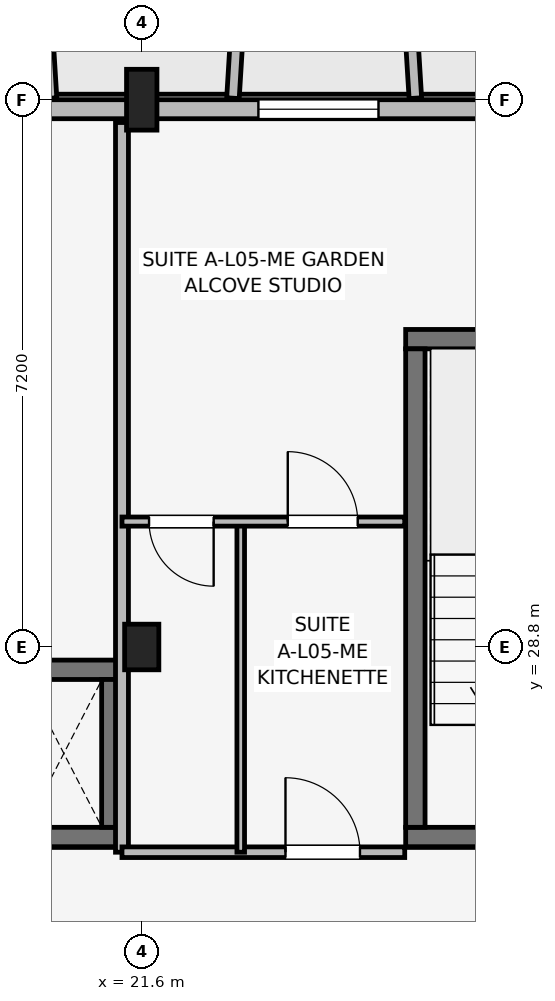
"""IFC4 building model, lengths in metres.
Left out: names, types, materials, properties, quantities, classifications, styles, units other than length and angle.
Written with IfcOpenShell. Run it as: python <this file> out.ifc"""

import sys

from ifc_helpers import new_model, si_unit, direction, frame, frame_2d, origin, origin_2d, place, context, subcontext, project, spatial, rectangle, extrude, element, fill, save


model = new_model("IFC4")
c1 = context("Model", 3, precision=1e-05, world=origin(), true_north=direction((0.0, 1.0)))
c2 = subcontext(c1, "Body", "Model", "MODEL_VIEW")
j1 = project(units=[si_unit("LENGTHUNIT", "METRE"), si_unit("PLANEANGLEUNIT", "RADIAN")], contexts=[c1])
p1 = place(None, origin())
s1 = spatial("IfcSite", under=j1, at=p1, CompositionType="ELEMENT")
p2 = place(p1, origin())
s2 = spatial("IfcBuilding", under=s1, at=p2, CompositionType="ELEMENT")
p3 = place(p2, frame((0.0, 0.0, 18.15)))
s3 = spatial("IfcBuildingStorey", under=s2, at=p3, CompositionType="ELEMENT", Elevation=18.15)
p4 = place(p3, frame((21.6, 28.8, 0.0), z_axis=(0.0, 0.0, 1.0), x_axis=(1.0, 0.0, 0.0)))
e1 = element("IfcColumn", 1, at=p4, inside=s3, PredefinedType="COLUMN", context=c2, shape_type="SweptSolid", body=[
    extrude(rectangle(XDim=0.45, YDim=0.6, at=origin_2d()), origin(), (0.0, 0.0, 1.0), 3.15),
])
p5 = place(p3, frame((21.6, 36.0, 0.0), z_axis=(0.0, 0.0, 1.0), x_axis=(1.0, 0.0, 0.0)))
e2 = element("IfcColumn", 2, at=p5, inside=s3, PredefinedType="COLUMN", context=c2, shape_type="SweptSolid", body=[
    extrude(rectangle(XDim=0.4, YDim=0.8, at=origin_2d()), origin(), (0.0, 0.0, 1.0), 3.15),
])
p6 = place(p3, frame((25.073, 26.3, 0.0), z_axis=(0.0, 0.0, 1.0), x_axis=(1.0, 0.0, 0.0)))
e3 = element("IfcWall", 3, at=p6, inside=s3, PredefinedType="SHEAR", context=c2, shape_type="SweptSolid", body=[
    extrude(rectangle(XDim=3.305, YDim=0.255, at=frame_2d((1.652, 0.0))), origin(), (0.0, 0.0, 1.0), 3.15),
])
p7 = place(p6, frame((1.127, 0.0, 0.0)))
e4 = element("IfcOpeningElement", 4, at=p7, cuts=e3, PredefinedType="OPENING", context=c2, shape_type="SweptSolid", body=[
    extrude(rectangle(XDim=1.05, YDim=2.12, at=frame_2d((0.525, 1.06))), frame((0.0, 0.137, 0.0), z_axis=(0.0, -1.0, 0.0), x_axis=(1.0, 0.0, 0.0)), (0.0, 0.0, 1.0), 0.275),
])
p8 = place(p3, frame((25.073, 32.85, 0.0), z_axis=(0.0, 0.0, 1.0), x_axis=(1.0, 0.0, 0.0)))
e5 = element("IfcWall", 5, at=p8, inside=s3, PredefinedType="SHEAR", context=c2, shape_type="SweptSolid", body=[
    extrude(rectangle(XDim=3.305, YDim=0.255, at=frame_2d((1.652, 0.0))), origin(), (0.0, 0.0, 1.0), 3.15),
])
p9 = place(p3, frame((25.2, 26.427, 0.0), z_axis=(0.0, 0.0, 1.0), x_axis=(0.0, 1.0, 0.0)))
e6 = element("IfcWall", 6, at=p9, inside=s3, PredefinedType="SHEAR", context=c2, shape_type="SweptSolid", body=[
    extrude(rectangle(XDim=6.295, YDim=0.255, at=frame_2d((3.147, 0.0))), origin(), (0.0, 0.0, 1.0), 3.15),
])
for number, where, z_axis, x_axis in (
    (7, (19.522, 26.3, 0.0), (0.0, 0.0, 1.0), (1.0, 0.0, 0.0)),
    (8, (19.522, 28.5, 0.0), (0.0, 0.0, 1.0), (1.0, 0.0, 0.0)),
):
    element("IfcWall", number, at=place(p3, frame(where, z_axis=z_axis, x_axis=x_axis)), inside=s3, PredefinedType="SHEAR", context=c2, shape_type="SweptSolid", body=[
        extrude(rectangle(XDim=1.805, YDim=0.255, at=frame_2d((0.902, 0.0))), origin(), (0.0, 0.0, 1.0), 3.15),
    ])
p10 = place(p3, frame((21.2, 26.427, 0.0), z_axis=(0.0, 0.0, 1.0), x_axis=(0.0, 1.0, 0.0)))
e9 = element("IfcWall", 9, at=p10, inside=s3, PredefinedType="SHEAR", context=c2, shape_type="SweptSolid", body=[
    extrude(rectangle(XDim=1.945, YDim=0.255, at=frame_2d((0.973, 0.0))), origin(), (0.0, 0.0, 1.0), 3.15),
])
p11 = place(p3, frame((32.6, 35.875, 0.0), z_axis=(0.0, 0.0, 1.0), x_axis=(-1.0, 0.0, 0.0)))
e10 = element("IfcWall", 10, at=p11, inside=s3, PredefinedType="SOLIDWALL", context=c2, shape_type="SweptSolid", body=[
    extrude(rectangle(XDim=29.2, YDim=0.25, at=frame_2d((14.6, 0.0))), origin(), (0.0, 0.0, 1.0), 2.43),
])
p12 = place(p11, frame((28.55, 0.0, 0.0), z_axis=(0.0, 0.0, 1.0), x_axis=(-1.0, 0.0, 0.0)))
e11 = element("IfcOpeningElement", 11, at=p12, cuts=e10, PredefinedType="OPENING", context=c2, shape_type="SweptSolid", body=[
    extrude(rectangle(XDim=1.5, YDim=2.15, at=frame_2d((0.75, 1.075))), frame((0.0, 0.135, 0.0), z_axis=(0.0, -1.0, 0.0), x_axis=(1.0, 0.0, 0.0)), (0.0, 0.0, 1.0), 0.27),
])
p13 = place(p11, frame((2.225, 0.0, 0.0), z_axis=(0.0, 0.0, 1.0), x_axis=(-1.0, 0.0, 0.0)))
e12 = element("IfcOpeningElement", 12, at=p13, cuts=e10, PredefinedType="OPENING", context=c2, shape_type="SweptSolid", body=[
    extrude(rectangle(XDim=1.65, YDim=2.15, at=frame_2d((0.825, 1.075))), frame((0.0, 0.135, 0.0), z_axis=(0.0, -1.0, 0.0), x_axis=(1.0, 0.0, 0.0)), (0.0, 0.0, 1.0), 0.27),
])
p14 = place(p11, frame((14.83, 0.0, 0.5)))
e13 = element("IfcOpeningElement", 13, at=p14, cuts=e10, PredefinedType="OPENING", context=c2, shape_type="SweptSolid", body=[
    extrude(rectangle(XDim=1.15, YDim=1.68, at=frame_2d((0.575, 0.84))), frame((0.0, 0.135, 0.0), z_axis=(0.0, -1.0, 0.0), x_axis=(1.0, 0.0, 0.0)), (0.0, 0.0, 1.0), 0.27),
])
p15 = place(p11, frame((7.885, 0.0, 0.7)))
e14 = element("IfcOpeningElement", 14, at=p15, cuts=e10, PredefinedType="OPENING", context=c2, shape_type="SweptSolid", body=[
    extrude(rectangle(XDim=1.58, YDim=1.6, at=frame_2d((0.79, 0.8))), frame((0.0, 0.135, 0.0), z_axis=(0.0, -1.0, 0.0), x_axis=(1.0, 0.0, 0.0)), (0.0, 0.0, 1.0), 0.27),
])
p16 = place(p11, frame((19.64, 0.0, 0.7)))
e15 = element("IfcOpeningElement", 15, at=p16, cuts=e10, PredefinedType="OPENING", context=c2, shape_type="SweptSolid", body=[
    extrude(rectangle(XDim=1.72, YDim=1.6, at=frame_2d((0.86, 0.8))), frame((0.0, 0.135, 0.0), z_axis=(0.0, -1.0, 0.0), x_axis=(1.0, 0.0, 0.0)), (0.0, 0.0, 1.0), 0.27),
])
p17 = place(p3, frame((20.4, 36.02, 0.0), z_axis=(0.0, 0.0, 1.0), x_axis=(-0.061046865508, 0.998134900808, 0.0)))
e16 = element("IfcWall", 16, at=p17, inside=s3, PredefinedType="ELEMENTEDWALL", context=c2, shape_type="SweptSolid", body=[
    extrude(rectangle(XDim=1.964, YDim=0.165, at=frame_2d((0.982, 0.0))), origin(), (0.0, 0.0, 1.0), 2.48),
])
for number, where, z_axis, x_axis in (
    (17, (22.8, 36.02, 0.0), (0.0, 0.0, 1.0), (0.061, 0.998, 0.0)),
    (18, (25.2, 36.02, 0.0), (0.0, 0.0, 1.0), (-0.061, 0.998, 0.0)),
):
    element("IfcWall", number, at=place(p3, frame(where, z_axis=z_axis, x_axis=x_axis)), inside=s3, PredefinedType="ELEMENTEDWALL", context=c2, shape_type="SweptSolid", body=[
        extrude(rectangle(XDim=1.964, YDim=0.165, at=frame_2d((0.982, 0.0))), origin(), (0.0, 0.0, 1.0), 2.53),
    ])
p18 = place(p3, frame((21.34, 26.1, 0.0), z_axis=(0.0, 0.0, 1.0), x_axis=(0.0, 1.0, 0.0)))
e19 = element("IfcWall", 19, at=p18, inside=s3, PredefinedType="PARTITIONING", context=c2, shape_type="SweptSolid", body=[
    extrude(rectangle(XDim=9.6, YDim=0.17, at=frame_2d((4.8, 0.0))), origin(), (0.0, 0.0, 1.0), 2.38),
])
p19 = place(p3, frame((21.34, 26.1, 0.0), z_axis=(0.0, 0.0, 1.0), x_axis=(1.0, 0.0, 0.0)))
e20 = element("IfcWall", 20, at=p19, inside=s3, PredefinedType="PARTITIONING", context=c2, shape_type="SweptSolid", body=[
    extrude(rectangle(XDim=3.72, YDim=0.14, at=frame_2d((1.86, 0.0))), origin(), (0.0, 0.0, 1.0), 2.38),
])
p20 = place(p19, frame((2.151, 0.0, 0.0)))
e21 = element("IfcOpeningElement", 21, at=p20, cuts=e20, PredefinedType="OPENING", context=c2, shape_type="SweptSolid", body=[
    extrude(rectangle(XDim=0.98, YDim=2.1, at=frame_2d((0.49, 1.05))), frame((0.0, 0.08, 0.0), z_axis=(0.0, -1.0, 0.0), x_axis=(1.0, 0.0, 0.0)), (0.0, 0.0, 1.0), 0.16),
])
p21 = place(p3, frame((22.902, 26.1, 0.0), z_axis=(0.0, 0.0, 1.0), x_axis=(0.0, 1.0, 0.0)))
e22 = element("IfcWall", 22, at=p21, inside=s3, PredefinedType="PARTITIONING", context=c2, shape_type="SweptSolid", body=[
    extrude(rectangle(XDim=4.35, YDim=0.1, at=frame_2d((2.175, 0.0))), origin(), (0.0, 0.0, 1.0), 2.375),
])
p22 = place(p3, frame((21.34, 30.45, 0.0), z_axis=(0.0, 0.0, 1.0), x_axis=(1.0, 0.0, 0.0)))
e23 = element("IfcWall", 23, at=p22, inside=s3, PredefinedType="PARTITIONING", context=c2, shape_type="SweptSolid", body=[
    extrude(rectangle(XDim=3.72, YDim=0.12, at=frame_2d((1.86, 0.0))), origin(), (0.0, 0.0, 1.0), 2.38),
])
p23 = place(p22, frame((1.206, 0.0, 0.0), z_axis=(0.0, 0.0, 1.0), x_axis=(-1.0, 0.0, 0.0)))
e24 = element("IfcOpeningElement", 24, at=p23, cuts=e23, PredefinedType="OPENING", context=c2, shape_type="SweptSolid", body=[
    extrude(rectangle(XDim=0.85, YDim=2.08, at=frame_2d((0.425, 1.04))), frame((0.0, 0.07, 0.0), z_axis=(0.0, -1.0, 0.0), x_axis=(1.0, 0.0, 0.0)), (0.0, 0.0, 1.0), 0.14),
])
p24 = place(p22, frame((2.181, 0.0, 0.0)))
e25 = element("IfcOpeningElement", 25, at=p24, cuts=e23, PredefinedType="OPENING", context=c2, shape_type="SweptSolid", body=[
    extrude(rectangle(XDim=0.92, YDim=2.08, at=frame_2d((0.46, 1.04))), frame((0.0, 0.07, 0.0), z_axis=(0.0, -1.0, 0.0), x_axis=(1.0, 0.0, 0.0)), (0.0, 0.0, 1.0), 0.14),
])
p25 = place(p15, origin())
e26 = element("IfcWindow", 26, at=p25, inside=s3, PartitioningType="SINGLE_PANEL", PredefinedType="WINDOW", context=c2, shape_type="SweptSolid", body=[
    extrude(rectangle(XDim=1.58, YDim=1.6, at=frame_2d((0.79, 0.8))), frame((0.0, 0.03, 0.0), z_axis=(0.0, -1.0, 0.0), x_axis=(1.0, 0.0, 0.0)), (0.0, 0.0, 1.0), 0.06),
])
fill(e14, e26)
p26 = place(p20, origin())
e27 = element("IfcDoor", 27, at=p26, inside=s3, OperationType="SINGLE_SWING_LEFT", PredefinedType="DOOR", context=c2, shape_type="SweptSolid", body=[
    extrude(rectangle(XDim=0.98, YDim=2.1, at=frame_2d((0.49, 1.05))), frame((0.0, 0.025, 0.0), z_axis=(0.0, -1.0, 0.0), x_axis=(1.0, 0.0, 0.0)), (0.0, 0.0, 1.0), 0.05),
])
fill(e21, e27)
p27 = place(p23, origin())
e28 = element("IfcDoor", 28, at=p27, inside=s3, OperationType="SINGLE_SWING_RIGHT", PredefinedType="DOOR", context=c2, shape_type="SweptSolid", body=[
    extrude(rectangle(XDim=0.85, YDim=2.08, at=frame_2d((0.425, 1.04))), frame((0.0, 0.025, 0.0), z_axis=(0.0, -1.0, 0.0), x_axis=(1.0, 0.0, 0.0)), (0.0, 0.0, 1.0), 0.05),
])
fill(e24, e28)
p28 = place(p24, origin())
e29 = element("IfcDoor", 29, at=p28, inside=s3, OperationType="SINGLE_SWING_LEFT", PredefinedType="DOOR", context=c2, shape_type="SweptSolid", body=[
    extrude(rectangle(XDim=0.92, YDim=2.08, at=frame_2d((0.46, 1.04))), frame((0.0, 0.025, 0.0), z_axis=(0.0, -1.0, 0.0), x_axis=(1.0, 0.0, 0.0)), (0.0, 0.0, 1.0), 0.05),
])
fill(e25, e29)
save(model, sys.argv[1])
